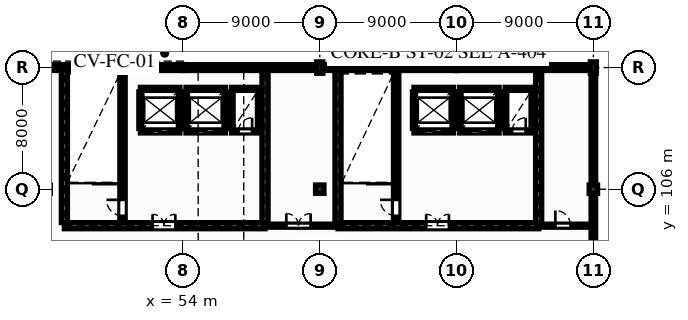
"""IFC4 building model, lengths in metres.
Left out: names, types, materials, properties, quantities, classifications, styles, units other than length and angle.
Written with IfcOpenShell. Run it as: python <this file> out.ifc"""

import sys

from ifc_helpers import new_model, si_unit, direction, frame, frame_2d, origin, origin_2d, place, context, subcontext, project, spatial, rectangle, extrude, element, fill, save


model = new_model("IFC4")
c1 = context("Model", 3, precision=1e-05, world=origin(), true_north=direction((0.0, 1.0)))
c2 = subcontext(c1, "Body", "Model", "MODEL_VIEW")
j1 = project(units=[si_unit("LENGTHUNIT", "METRE"), si_unit("PLANEANGLEUNIT", "RADIAN")], contexts=[c1])
p1 = place(None, origin())
s1 = spatial("IfcSite", under=j1, at=p1, CompositionType="ELEMENT")
p2 = place(p1, origin())
s2 = spatial("IfcBuilding", under=s1, at=p2, CompositionType="ELEMENT")
p3 = place(p2, frame((0.0, 0.0, 20.26)))
s3 = spatial("IfcBuildingStorey", under=s2, at=p3, CompositionType="ELEMENT", Elevation=20.26)
p4 = place(p3, frame((63.0, 106.0, 0.0), z_axis=(0.0, 0.0, 1.0), x_axis=(1.0, 0.0, 0.0)))
e1 = element("IfcColumn", 1, at=p4, inside=s3, PredefinedType="COLUMN", context=c2, shape_type="SweptSolid", body=[
    extrude(rectangle(XDim=0.55, YDim=0.55, at=origin_2d()), origin(), (0.0, 0.0, 1.0), 3.64),
])
p5 = place(p3, frame((63.0, 114.0, 0.0), z_axis=(0.0, 0.0, 1.0), x_axis=(0.0, 1.0, 0.0)))
e2 = element("IfcColumn", 2, at=p5, inside=s3, PredefinedType="COLUMN", context=c2, shape_type="SweptSolid", body=[
    extrude(rectangle(XDim=0.4, YDim=0.75, at=origin_2d()), origin(), (0.0, 0.0, 1.0), 3.64),
])
p6 = place(p3, frame((81.0, 106.0, 0.0), z_axis=(0.0, 0.0, 1.0), x_axis=(1.0, 0.0, 0.0)))
e3 = element("IfcColumn", 3, at=p6, inside=s3, PredefinedType="COLUMN", context=c2, shape_type="SweptSolid", body=[
    extrude(rectangle(XDim=0.55, YDim=0.55, at=origin_2d()), origin(), (0.0, 0.0, 1.0), 3.64),
])
p7 = place(p3, frame((81.0, 114.0, 0.0), z_axis=(0.0, 0.0, 1.0), x_axis=(0.0, 1.0, 0.0)))
e4 = element("IfcColumn", 4, at=p7, inside=s3, PredefinedType="COLUMN", context=c2, shape_type="SweptSolid", body=[
    extrude(rectangle(XDim=0.4, YDim=0.75, at=origin_2d()), origin(), (0.0, 0.0, 1.0), 3.64),
])
for number, where, z_axis, x_axis in (
    (5, (45.0, 114.0, 0.0), (0.0, 0.0, 1.0), (1.0, 0.0, 0.0)),
    (6, (54.0, 114.0, 0.0), (0.0, 0.0, 1.0), (1.0, 0.0, 0.0)),
    (7, (63.0, 114.0, 0.0), (0.0, 0.0, 1.0), (1.0, 0.0, 0.0)),
    (8, (72.0, 114.0, 0.0), (0.0, 0.0, 1.0), (1.0, 0.0, 0.0)),
):
    element("IfcWall", number, at=place(p3, frame(where, z_axis=z_axis, x_axis=x_axis)), inside=s3, PredefinedType="SOLIDWALL", context=c2, shape_type="SweptSolid", body=[
        extrude(rectangle(XDim=9.0, YDim=0.38, at=frame_2d((4.5, 0.0))), origin(), (0.0, 0.0, 1.0), 3.39),
    ])
p8 = place(p3, frame((81.0, 90.0, 0.0), z_axis=(0.0, 0.0, 1.0), x_axis=(0.0, 1.0, 0.0)))
e9 = element("IfcWall", 9, at=p8, inside=s3, PredefinedType="SOLIDWALL", context=c2, shape_type="SweptSolid", body=[
    extrude(rectangle(XDim=24.0, YDim=0.3, at=frame_2d((12.0, 0.0))), origin(), (0.0, 0.0, 1.0), 2.585),
])
p9 = place(p8, frame((3.2, 0.0, 0.365)))
e10 = element("IfcOpeningElement", 10, at=p9, cuts=e9, PredefinedType="OPENING", context=c2, shape_type="SweptSolid", body=[
    extrude(rectangle(XDim=1.5, YDim=2.1, at=frame_2d((0.75, 1.05))), frame((0.0, 0.16, 0.0), z_axis=(0.0, -1.0, 0.0), x_axis=(1.0, 0.0, 0.0)), (0.0, 0.0, 1.0), 0.32),
])
p10 = place(p8, frame((10.5, 0.0, 0.615)))
e11 = element("IfcOpeningElement", 11, at=p10, cuts=e9, PredefinedType="OPENING", context=c2, shape_type="SweptSolid", body=[
    extrude(rectangle(XDim=1.35, YDim=1.85, at=frame_2d((0.675, 0.925))), frame((0.0, 0.16, 0.0), z_axis=(0.0, -1.0, 0.0), x_axis=(1.0, 0.0, 0.0)), (0.0, 0.0, 1.0), 0.32),
])
p11 = place(p3, frame((81.0, 90.22, 3.64), z_axis=(0.0, 0.0, 1.0), x_axis=(0.0, 1.0, 0.0)))
e12 = element("IfcWall", 12, at=p11, inside=s3, PredefinedType="PARAPET", context=c2, shape_type="SweptSolid", body=[
    extrude(rectangle(XDim=23.56, YDim=0.22, at=frame_2d((11.78, 0.0))), origin(), (0.0, 0.0, 1.0), 0.42),
])
p12 = place(p3, frame((80.78, 114.0, 3.64), z_axis=(0.0, 0.0, 1.0), x_axis=(-1.0, 0.0, 0.0)))
e13 = element("IfcWall", 13, at=p12, inside=s3, PredefinedType="PARAPET", context=c2, shape_type="SweptSolid", body=[
    extrude(rectangle(XDim=35.56, YDim=0.22, at=frame_2d((17.78, 0.0))), origin(), (0.0, 0.0, 1.0), 0.42),
])
p13 = place(p3, frame((46.2, 103.6, 0.0), z_axis=(0.0, 0.0, 1.0), x_axis=(1.0, 0.0, 0.0)))
e14 = element("IfcWall", 14, at=p13, inside=s3, PredefinedType="SHEAR", context=c2, shape_type="SweptSolid", body=[
    extrude(rectangle(XDim=13.2, YDim=0.4, at=frame_2d((6.6, 0.0))), origin(), (0.0, 0.0, 1.0), 3.39),
])
p14 = place(p13, frame((5.8, 0.0, 0.0)))
e15 = element("IfcOpeningElement", 15, at=p14, cuts=e14, PredefinedType="OPENING", context=c2, shape_type="SweptSolid", body=[
    extrude(rectangle(XDim=1.5, YDim=2.2, at=frame_2d((0.75, 1.1))), frame((0.0, 0.21, 0.0), z_axis=(0.0, -1.0, 0.0), x_axis=(1.0, 0.0, 0.0)), (0.0, 0.0, 1.0), 0.42),
])
for number, where, z_axis, x_axis in (
    (16, (46.2, 103.8, 0.0), (0.0, 0.0, 1.0), (0.0, 1.0, 0.0)),
    (17, (59.4, 103.8, 0.0), (0.0, 0.0, 1.0), (0.0, 1.0, 0.0)),
):
    element("IfcWall", number, at=place(p3, frame(where, z_axis=z_axis, x_axis=x_axis)), inside=s3, PredefinedType="SHEAR", context=c2, shape_type="SweptSolid", body=[
        extrude(rectangle(XDim=10.01, YDim=0.4, at=frame_2d((5.005, 0.0))), origin(), (0.0, 0.0, 1.0), 3.39),
    ])
p15 = place(p3, frame((50.025, 103.8, 0.0), z_axis=(0.0, 0.0, 1.0), x_axis=(0.0, 1.0, 0.0)))
e18 = element("IfcWall", 18, at=p15, inside=s3, PredefinedType="SHEAR", context=c2, shape_type="SweptSolid", body=[
    extrude(rectangle(XDim=10.01, YDim=0.35, at=frame_2d((5.005, 0.0))), origin(), (0.0, 0.0, 1.0), 3.39),
])
p16 = place(p15, frame((0.45, 0.0, 0.0)))
e19 = element("IfcOpeningElement", 19, at=p16, cuts=e18, PredefinedType="OPENING", context=c2, shape_type="SweptSolid", body=[
    extrude(rectangle(XDim=1.05, YDim=2.2, at=frame_2d((0.525, 1.1))), frame((0.0, 0.185, 0.0), z_axis=(0.0, -1.0, 0.0), x_axis=(1.0, 0.0, 0.0)), (0.0, 0.0, 1.0), 0.37),
])
p17 = place(p3, frame((51.2, 109.8, 0.0), z_axis=(0.0, 0.0, 1.0), x_axis=(1.0, 0.0, 0.0)))
e20 = element("IfcWall", 20, at=p17, inside=s3, PredefinedType="PARTITIONING", context=c2, shape_type="SweptSolid", body=[
    extrude(rectangle(XDim=2.6, YDim=0.2, at=frame_2d((1.3, 0.0))), origin(), (0.0, 0.0, 1.0), 3.39),
])
p18 = place(p17, frame((0.75, 0.0, 0.0)))
e21 = element("IfcOpeningElement", 21, at=p18, cuts=e20, PredefinedType="OPENING", context=c2, shape_type="SweptSolid", body=[
    extrude(rectangle(XDim=1.1, YDim=2.15, at=frame_2d((0.55, 1.075))), frame((0.0, 0.11, 0.0), z_axis=(0.0, -1.0, 0.0), x_axis=(1.0, 0.0, 0.0)), (0.0, 0.0, 1.0), 0.22),
])
p19 = place(p3, frame((51.2, 112.6, 0.0), z_axis=(0.0, 0.0, 1.0), x_axis=(1.0, 0.0, 0.0)))
e22 = element("IfcWall", 22, at=p19, inside=s3, PredefinedType="PARTITIONING", context=c2, shape_type="SweptSolid", body=[
    extrude(rectangle(XDim=2.6, YDim=0.2, at=frame_2d((1.3, 0.0))), origin(), (0.0, 0.0, 1.0), 3.39),
])
for number, where, z_axis, x_axis in (
    (23, (51.2, 110.0, 0.0), (0.0, 0.0, 1.0), (0.0, 1.0, 0.0)),
    (24, (53.8, 110.0, 0.0), (0.0, 0.0, 1.0), (0.0, 1.0, 0.0)),
):
    element("IfcWall", number, at=place(p3, frame(where, z_axis=z_axis, x_axis=x_axis)), inside=s3, PredefinedType="PARTITIONING", context=c2, shape_type="SweptSolid", body=[
        extrude(rectangle(XDim=2.4, YDim=0.2, at=frame_2d((1.2, 0.0))), origin(), (0.0, 0.0, 1.0), 3.39),
    ])
p20 = place(p3, frame((54.2, 109.8, 0.0), z_axis=(0.0, 0.0, 1.0), x_axis=(1.0, 0.0, 0.0)))
e25 = element("IfcWall", 25, at=p20, inside=s3, PredefinedType="PARTITIONING", context=c2, shape_type="SweptSolid", body=[
    extrude(rectangle(XDim=2.6, YDim=0.2, at=frame_2d((1.3, 0.0))), origin(), (0.0, 0.0, 1.0), 3.39),
])
p21 = place(p20, frame((0.75, 0.0, 0.0)))
e26 = element("IfcOpeningElement", 26, at=p21, cuts=e25, PredefinedType="OPENING", context=c2, shape_type="SweptSolid", body=[
    extrude(rectangle(XDim=1.1, YDim=2.15, at=frame_2d((0.55, 1.075))), frame((0.0, 0.11, 0.0), z_axis=(0.0, -1.0, 0.0), x_axis=(1.0, 0.0, 0.0)), (0.0, 0.0, 1.0), 0.22),
])
p22 = place(p3, frame((54.2, 112.6, 0.0), z_axis=(0.0, 0.0, 1.0), x_axis=(1.0, 0.0, 0.0)))
e27 = element("IfcWall", 27, at=p22, inside=s3, PredefinedType="PARTITIONING", context=c2, shape_type="SweptSolid", body=[
    extrude(rectangle(XDim=2.6, YDim=0.2, at=frame_2d((1.3, 0.0))), origin(), (0.0, 0.0, 1.0), 3.39),
])
for number, where, z_axis, x_axis in (
    (28, (54.2, 110.0, 0.0), (0.0, 0.0, 1.0), (0.0, 1.0, 0.0)),
    (29, (56.8, 110.0, 0.0), (0.0, 0.0, 1.0), (0.0, 1.0, 0.0)),
):
    element("IfcWall", number, at=place(p3, frame(where, z_axis=z_axis, x_axis=x_axis)), inside=s3, PredefinedType="PARTITIONING", context=c2, shape_type="SweptSolid", body=[
        extrude(rectangle(XDim=2.4, YDim=0.2, at=frame_2d((1.2, 0.0))), origin(), (0.0, 0.0, 1.0), 3.39),
    ])
p23 = place(p3, frame((57.2, 109.8, 0.0), z_axis=(0.0, 0.0, 1.0), x_axis=(1.0, 0.0, 0.0)))
e30 = element("IfcWall", 30, at=p23, inside=s3, PredefinedType="PARTITIONING", context=c2, shape_type="SweptSolid", body=[
    extrude(rectangle(XDim=1.8, YDim=0.2, at=frame_2d((0.9, 0.0))), origin(), (0.0, 0.0, 1.0), 3.39),
])
p24 = place(p23, frame((0.45, 0.0, 0.0)))
e31 = element("IfcOpeningElement", 31, at=p24, cuts=e30, PredefinedType="OPENING", context=c2, shape_type="SweptSolid", body=[
    extrude(rectangle(XDim=0.9, YDim=2.1, at=frame_2d((0.45, 1.05))), frame((0.0, 0.11, 0.0), z_axis=(0.0, -1.0, 0.0), x_axis=(1.0, 0.0, 0.0)), (0.0, 0.0, 1.0), 0.22),
])
p25 = place(p3, frame((57.2, 112.6, 0.0), z_axis=(0.0, 0.0, 1.0), x_axis=(1.0, 0.0, 0.0)))
e32 = element("IfcWall", 32, at=p25, inside=s3, PredefinedType="PARTITIONING", context=c2, shape_type="SweptSolid", body=[
    extrude(rectangle(XDim=1.8, YDim=0.2, at=frame_2d((0.9, 0.0))), origin(), (0.0, 0.0, 1.0), 3.39),
])
for number, where, z_axis, x_axis in (
    (33, (57.2, 110.0, 0.0), (0.0, 0.0, 1.0), (0.0, 1.0, 0.0)),
    (34, (59.0, 110.0, 0.0), (0.0, 0.0, 1.0), (0.0, 1.0, 0.0)),
):
    element("IfcWall", number, at=place(p3, frame(where, z_axis=z_axis, x_axis=x_axis)), inside=s3, PredefinedType="PARTITIONING", context=c2, shape_type="SweptSolid", body=[
        extrude(rectangle(XDim=2.4, YDim=0.2, at=frame_2d((1.2, 0.0))), origin(), (0.0, 0.0, 1.0), 3.39),
    ])
p26 = place(p3, frame((64.2, 103.6, 0.0), z_axis=(0.0, 0.0, 1.0), x_axis=(1.0, 0.0, 0.0)))
e35 = element("IfcWall", 35, at=p26, inside=s3, PredefinedType="SHEAR", context=c2, shape_type="SweptSolid", body=[
    extrude(rectangle(XDim=13.2, YDim=0.4, at=frame_2d((6.6, 0.0))), origin(), (0.0, 0.0, 1.0), 3.39),
])
p27 = place(p26, frame((5.8, 0.0, 0.0)))
e36 = element("IfcOpeningElement", 36, at=p27, cuts=e35, PredefinedType="OPENING", context=c2, shape_type="SweptSolid", body=[
    extrude(rectangle(XDim=1.5, YDim=2.2, at=frame_2d((0.75, 1.1))), frame((0.0, 0.21, 0.0), z_axis=(0.0, -1.0, 0.0), x_axis=(1.0, 0.0, 0.0)), (0.0, 0.0, 1.0), 0.42),
])
for number, where, z_axis, x_axis in (
    (37, (64.2, 103.8, 0.0), (0.0, 0.0, 1.0), (0.0, 1.0, 0.0)),
    (38, (77.4, 103.8, 0.0), (0.0, 0.0, 1.0), (0.0, 1.0, 0.0)),
):
    element("IfcWall", number, at=place(p3, frame(where, z_axis=z_axis, x_axis=x_axis)), inside=s3, PredefinedType="SHEAR", context=c2, shape_type="SweptSolid", body=[
        extrude(rectangle(XDim=10.01, YDim=0.4, at=frame_2d((5.005, 0.0))), origin(), (0.0, 0.0, 1.0), 3.39),
    ])
p28 = place(p3, frame((68.025, 103.8, 0.0), z_axis=(0.0, 0.0, 1.0), x_axis=(0.0, 1.0, 0.0)))
e39 = element("IfcWall", 39, at=p28, inside=s3, PredefinedType="SHEAR", context=c2, shape_type="SweptSolid", body=[
    extrude(rectangle(XDim=10.01, YDim=0.35, at=frame_2d((5.005, 0.0))), origin(), (0.0, 0.0, 1.0), 3.39),
])
p29 = place(p28, frame((0.45, 0.0, 0.0)))
e40 = element("IfcOpeningElement", 40, at=p29, cuts=e39, PredefinedType="OPENING", context=c2, shape_type="SweptSolid", body=[
    extrude(rectangle(XDim=1.05, YDim=2.2, at=frame_2d((0.525, 1.1))), frame((0.0, 0.185, 0.0), z_axis=(0.0, -1.0, 0.0), x_axis=(1.0, 0.0, 0.0)), (0.0, 0.0, 1.0), 0.37),
])
p30 = place(p3, frame((69.2, 109.8, 0.0), z_axis=(0.0, 0.0, 1.0), x_axis=(1.0, 0.0, 0.0)))
e41 = element("IfcWall", 41, at=p30, inside=s3, PredefinedType="PARTITIONING", context=c2, shape_type="SweptSolid", body=[
    extrude(rectangle(XDim=2.6, YDim=0.2, at=frame_2d((1.3, 0.0))), origin(), (0.0, 0.0, 1.0), 3.39),
])
p31 = place(p30, frame((0.75, 0.0, 0.0)))
e42 = element("IfcOpeningElement", 42, at=p31, cuts=e41, PredefinedType="OPENING", context=c2, shape_type="SweptSolid", body=[
    extrude(rectangle(XDim=1.1, YDim=2.15, at=frame_2d((0.55, 1.075))), frame((0.0, 0.11, 0.0), z_axis=(0.0, -1.0, 0.0), x_axis=(1.0, 0.0, 0.0)), (0.0, 0.0, 1.0), 0.22),
])
p32 = place(p3, frame((69.2, 112.6, 0.0), z_axis=(0.0, 0.0, 1.0), x_axis=(1.0, 0.0, 0.0)))
e43 = element("IfcWall", 43, at=p32, inside=s3, PredefinedType="PARTITIONING", context=c2, shape_type="SweptSolid", body=[
    extrude(rectangle(XDim=2.6, YDim=0.2, at=frame_2d((1.3, 0.0))), origin(), (0.0, 0.0, 1.0), 3.39),
])
for number, where, z_axis, x_axis in (
    (44, (69.2, 110.0, 0.0), (0.0, 0.0, 1.0), (0.0, 1.0, 0.0)),
    (45, (71.8, 110.0, 0.0), (0.0, 0.0, 1.0), (0.0, 1.0, 0.0)),
):
    element("IfcWall", number, at=place(p3, frame(where, z_axis=z_axis, x_axis=x_axis)), inside=s3, PredefinedType="PARTITIONING", context=c2, shape_type="SweptSolid", body=[
        extrude(rectangle(XDim=2.4, YDim=0.2, at=frame_2d((1.2, 0.0))), origin(), (0.0, 0.0, 1.0), 3.39),
    ])
p33 = place(p3, frame((72.2, 109.8, 0.0), z_axis=(0.0, 0.0, 1.0), x_axis=(1.0, 0.0, 0.0)))
e46 = element("IfcWall", 46, at=p33, inside=s3, PredefinedType="PARTITIONING", context=c2, shape_type="SweptSolid", body=[
    extrude(rectangle(XDim=2.6, YDim=0.2, at=frame_2d((1.3, 0.0))), origin(), (0.0, 0.0, 1.0), 3.39),
])
p34 = place(p33, frame((0.75, 0.0, 0.0)))
e47 = element("IfcOpeningElement", 47, at=p34, cuts=e46, PredefinedType="OPENING", context=c2, shape_type="SweptSolid", body=[
    extrude(rectangle(XDim=1.1, YDim=2.15, at=frame_2d((0.55, 1.075))), frame((0.0, 0.11, 0.0), z_axis=(0.0, -1.0, 0.0), x_axis=(1.0, 0.0, 0.0)), (0.0, 0.0, 1.0), 0.22),
])
p35 = place(p3, frame((72.2, 112.6, 0.0), z_axis=(0.0, 0.0, 1.0), x_axis=(1.0, 0.0, 0.0)))
e48 = element("IfcWall", 48, at=p35, inside=s3, PredefinedType="PARTITIONING", context=c2, shape_type="SweptSolid", body=[
    extrude(rectangle(XDim=2.6, YDim=0.2, at=frame_2d((1.3, 0.0))), origin(), (0.0, 0.0, 1.0), 3.39),
])
for number, where, z_axis, x_axis in (
    (49, (72.2, 110.0, 0.0), (0.0, 0.0, 1.0), (0.0, 1.0, 0.0)),
    (50, (74.8, 110.0, 0.0), (0.0, 0.0, 1.0), (0.0, 1.0, 0.0)),
):
    element("IfcWall", number, at=place(p3, frame(where, z_axis=z_axis, x_axis=x_axis)), inside=s3, PredefinedType="PARTITIONING", context=c2, shape_type="SweptSolid", body=[
        extrude(rectangle(XDim=2.4, YDim=0.2, at=frame_2d((1.2, 0.0))), origin(), (0.0, 0.0, 1.0), 3.39),
    ])
p36 = place(p3, frame((75.2, 109.8, 0.0), z_axis=(0.0, 0.0, 1.0), x_axis=(1.0, 0.0, 0.0)))
e51 = element("IfcWall", 51, at=p36, inside=s3, PredefinedType="PARTITIONING", context=c2, shape_type="SweptSolid", body=[
    extrude(rectangle(XDim=1.8, YDim=0.2, at=frame_2d((0.9, 0.0))), origin(), (0.0, 0.0, 1.0), 3.39),
])
p37 = place(p36, frame((0.45, 0.0, 0.0)))
e52 = element("IfcOpeningElement", 52, at=p37, cuts=e51, PredefinedType="OPENING", context=c2, shape_type="SweptSolid", body=[
    extrude(rectangle(XDim=0.9, YDim=2.1, at=frame_2d((0.45, 1.05))), frame((0.0, 0.11, 0.0), z_axis=(0.0, -1.0, 0.0), x_axis=(1.0, 0.0, 0.0)), (0.0, 0.0, 1.0), 0.22),
])
p38 = place(p3, frame((75.2, 112.6, 0.0), z_axis=(0.0, 0.0, 1.0), x_axis=(1.0, 0.0, 0.0)))
e53 = element("IfcWall", 53, at=p38, inside=s3, PredefinedType="PARTITIONING", context=c2, shape_type="SweptSolid", body=[
    extrude(rectangle(XDim=1.8, YDim=0.2, at=frame_2d((0.9, 0.0))), origin(), (0.0, 0.0, 1.0), 3.39),
])
for number, where, z_axis, x_axis in (
    (54, (75.2, 110.0, 0.0), (0.0, 0.0, 1.0), (0.0, 1.0, 0.0)),
    (55, (77.0, 110.0, 0.0), (0.0, 0.0, 1.0), (0.0, 1.0, 0.0)),
):
    element("IfcWall", number, at=place(p3, frame(where, z_axis=z_axis, x_axis=x_axis)), inside=s3, PredefinedType="PARTITIONING", context=c2, shape_type="SweptSolid", body=[
        extrude(rectangle(XDim=2.4, YDim=0.2, at=frame_2d((1.2, 0.0))), origin(), (0.0, 0.0, 1.0), 3.39),
    ])
p39 = place(p3, frame((59.4, 103.6, 0.0), z_axis=(0.0, 0.0, 1.0), x_axis=(1.0, 0.0, 0.0)))
e56 = element("IfcWall", 56, at=p39, inside=s3, PredefinedType="PARTITIONING", context=c2, shape_type="SweptSolid", body=[
    extrude(rectangle(XDim=4.8, YDim=0.2, at=frame_2d((2.4, 0.0))), origin(), (0.0, 0.0, 1.0), 3.39),
])
p40 = place(p39, frame((1.4, 0.0, 0.0)))
e57 = element("IfcOpeningElement", 57, at=p40, cuts=e56, PredefinedType="OPENING", context=c2, shape_type="SweptSolid", body=[
    extrude(rectangle(XDim=1.6, YDim=2.2, at=frame_2d((0.8, 1.1))), frame((0.0, 0.11, 0.0), z_axis=(0.0, -1.0, 0.0), x_axis=(1.0, 0.0, 0.0)), (0.0, 0.0, 1.0), 0.22),
])
p41 = place(p3, frame((77.4, 103.6, 0.0), z_axis=(0.0, 0.0, 1.0), x_axis=(1.0, 0.0, 0.0)))
e58 = element("IfcWall", 58, at=p41, inside=s3, PredefinedType="PARTITIONING", context=c2, shape_type="SweptSolid", body=[
    extrude(rectangle(XDim=3.6, YDim=0.2, at=frame_2d((1.8, 0.0))), origin(), (0.0, 0.0, 1.0), 3.39),
])
p42 = place(p41, frame((1.1, 0.0, 0.0)))
e59 = element("IfcOpeningElement", 59, at=p42, cuts=e58, PredefinedType="OPENING", context=c2, shape_type="SweptSolid", body=[
    extrude(rectangle(XDim=1.0, YDim=2.15, at=frame_2d((0.5, 1.075))), frame((0.0, 0.11, 0.0), z_axis=(0.0, -1.0, 0.0), x_axis=(1.0, 0.0, 0.0)), (0.0, 0.0, 1.0), 0.22),
])
p43 = place(p14, origin())
e60 = element("IfcDoor", 60, at=p43, inside=s3, OperationType="DOUBLE_DOOR_SINGLE_SWING", PredefinedType="DOOR", context=c2, shape_type="SweptSolid", body=[
    extrude(rectangle(XDim=1.5, YDim=2.2, at=frame_2d((0.75, 1.1))), frame((0.0, 0.025, 0.0), z_axis=(0.0, -1.0, 0.0), x_axis=(1.0, 0.0, 0.0)), (0.0, 0.0, 1.0), 0.05),
])
fill(e15, e60)
p44 = place(p16, origin())
e61 = element("IfcDoor", 61, at=p44, inside=s3, OperationType="SINGLE_SWING_RIGHT", PredefinedType="DOOR", context=c2, shape_type="SweptSolid", body=[
    extrude(rectangle(XDim=1.05, YDim=2.2, at=frame_2d((0.525, 1.1))), frame((0.0, 0.025, 0.0), z_axis=(0.0, -1.0, 0.0), x_axis=(1.0, 0.0, 0.0)), (0.0, 0.0, 1.0), 0.05),
])
fill(e19, e61)
p45 = place(p18, origin())
e62 = element("IfcDoor", 62, at=p45, inside=s3, OperationType="SLIDING_TO_LEFT", PredefinedType="DOOR", context=c2, shape_type="SweptSolid", body=[
    extrude(rectangle(XDim=1.1, YDim=2.15, at=frame_2d((0.55, 1.075))), frame((0.0, 0.025, 0.0), z_axis=(0.0, -1.0, 0.0), x_axis=(1.0, 0.0, 0.0)), (0.0, 0.0, 1.0), 0.05),
])
fill(e21, e62)
p46 = place(p21, origin())
e63 = element("IfcDoor", 63, at=p46, inside=s3, OperationType="SLIDING_TO_RIGHT", PredefinedType="DOOR", context=c2, shape_type="SweptSolid", body=[
    extrude(rectangle(XDim=1.1, YDim=2.15, at=frame_2d((0.55, 1.075))), frame((0.0, 0.025, 0.0), z_axis=(0.0, -1.0, 0.0), x_axis=(1.0, 0.0, 0.0)), (0.0, 0.0, 1.0), 0.05),
])
fill(e26, e63)
p47 = place(p24, origin())
e64 = element("IfcDoor", 64, at=p47, inside=s3, OperationType="SINGLE_SWING_RIGHT", PredefinedType="DOOR", context=c2, shape_type="SweptSolid", body=[
    extrude(rectangle(XDim=0.9, YDim=2.1, at=frame_2d((0.45, 1.05))), frame((0.0, 0.025, 0.0), z_axis=(0.0, -1.0, 0.0), x_axis=(1.0, 0.0, 0.0)), (0.0, 0.0, 1.0), 0.05),
])
fill(e31, e64)
p48 = place(p27, origin())
e65 = element("IfcDoor", 65, at=p48, inside=s3, OperationType="DOUBLE_DOOR_SINGLE_SWING", PredefinedType="DOOR", context=c2, shape_type="SweptSolid", body=[
    extrude(rectangle(XDim=1.5, YDim=2.2, at=frame_2d((0.75, 1.1))), frame((0.0, 0.025, 0.0), z_axis=(0.0, -1.0, 0.0), x_axis=(1.0, 0.0, 0.0)), (0.0, 0.0, 1.0), 0.05),
])
fill(e36, e65)
p49 = place(p29, origin())
e66 = element("IfcDoor", 66, at=p49, inside=s3, OperationType="SINGLE_SWING_RIGHT", PredefinedType="DOOR", context=c2, shape_type="SweptSolid", body=[
    extrude(rectangle(XDim=1.05, YDim=2.2, at=frame_2d((0.525, 1.1))), frame((0.0, 0.025, 0.0), z_axis=(0.0, -1.0, 0.0), x_axis=(1.0, 0.0, 0.0)), (0.0, 0.0, 1.0), 0.05),
])
fill(e40, e66)
p50 = place(p31, origin())
e67 = element("IfcDoor", 67, at=p50, inside=s3, OperationType="SLIDING_TO_LEFT", PredefinedType="DOOR", context=c2, shape_type="SweptSolid", body=[
    extrude(rectangle(XDim=1.1, YDim=2.15, at=frame_2d((0.55, 1.075))), frame((0.0, 0.025, 0.0), z_axis=(0.0, -1.0, 0.0), x_axis=(1.0, 0.0, 0.0)), (0.0, 0.0, 1.0), 0.05),
])
fill(e42, e67)
p51 = place(p34, origin())
e68 = element("IfcDoor", 68, at=p51, inside=s3, OperationType="SLIDING_TO_RIGHT", PredefinedType="DOOR", context=c2, shape_type="SweptSolid", body=[
    extrude(rectangle(XDim=1.1, YDim=2.15, at=frame_2d((0.55, 1.075))), frame((0.0, 0.025, 0.0), z_axis=(0.0, -1.0, 0.0), x_axis=(1.0, 0.0, 0.0)), (0.0, 0.0, 1.0), 0.05),
])
fill(e47, e68)
p52 = place(p37, origin())
e69 = element("IfcDoor", 69, at=p52, inside=s3, OperationType="SINGLE_SWING_RIGHT", PredefinedType="DOOR", context=c2, shape_type="SweptSolid", body=[
    extrude(rectangle(XDim=0.9, YDim=2.1, at=frame_2d((0.45, 1.05))), frame((0.0, 0.025, 0.0), z_axis=(0.0, -1.0, 0.0), x_axis=(1.0, 0.0, 0.0)), (0.0, 0.0, 1.0), 0.05),
])
fill(e52, e69)
p53 = place(p40, origin())
e70 = element("IfcDoor", 70, at=p53, inside=s3, OperationType="DOUBLE_DOOR_SINGLE_SWING", PredefinedType="DOOR", context=c2, shape_type="SweptSolid", body=[
    extrude(rectangle(XDim=1.6, YDim=2.2, at=frame_2d((0.8, 1.1))), frame((0.0, 0.025, 0.0), z_axis=(0.0, -1.0, 0.0), x_axis=(1.0, 0.0, 0.0)), (0.0, 0.0, 1.0), 0.05),
])
fill(e57, e70)
p54 = place(p42, origin())
e71 = element("IfcDoor", 71, at=p54, inside=s3, OperationType="SINGLE_SWING_LEFT", PredefinedType="DOOR", context=c2, shape_type="SweptSolid", body=[
    extrude(rectangle(XDim=1.0, YDim=2.15, at=frame_2d((0.5, 1.075))), frame((0.0, 0.025, 0.0), z_axis=(0.0, -1.0, 0.0), x_axis=(1.0, 0.0, 0.0)), (0.0, 0.0, 1.0), 0.05),
])
fill(e59, e71)
save(model, sys.argv[1])
